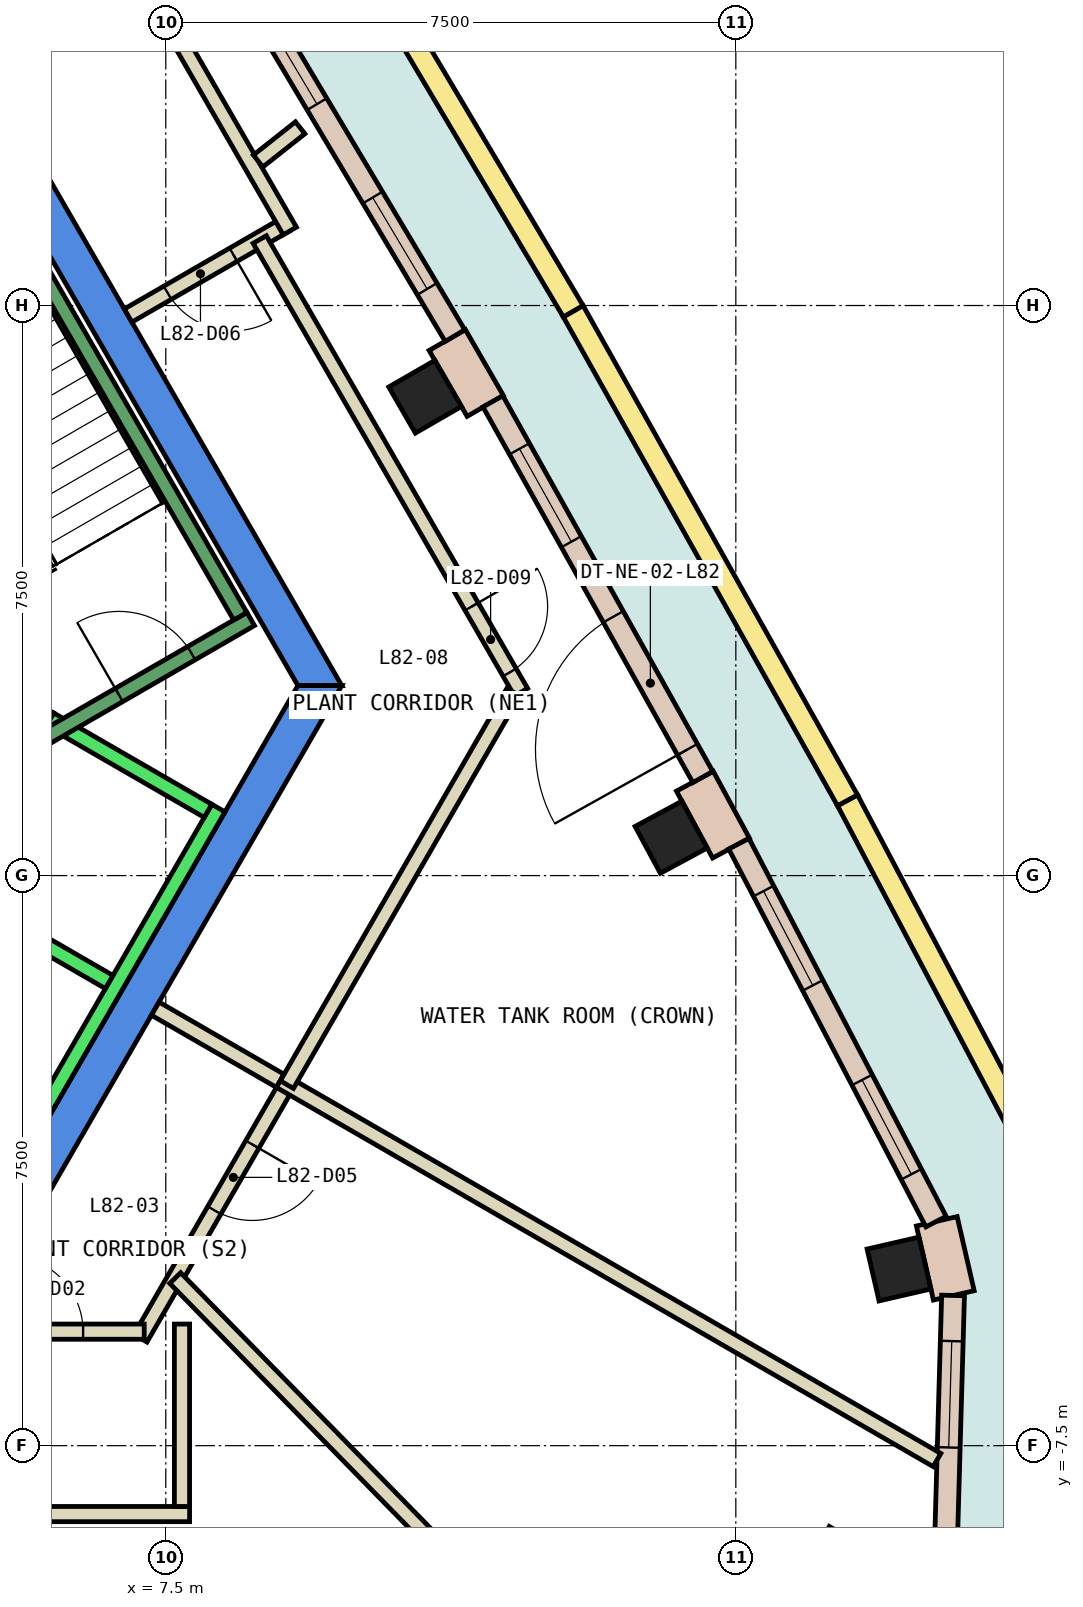
"""IFC4 building model, lengths in metres.
Left out: names, types, materials, properties, quantities, classifications, styles, units other than length and angle.
Written with IfcOpenShell. Run it as: python <this file> out.ifc"""

import sys

from ifc_helpers import new_model, si_unit, direction, frame, frame_2d, origin, origin_2d, place, context, subcontext, project, spatial, polyline, rectangle, outline, extrude, element, fill, save


model = new_model("IFC4")
c1 = context("Model", 3, precision=1e-05, world=origin(), true_north=direction((0.0, 1.0)))
c2 = subcontext(c1, "Body", "Model", "MODEL_VIEW")
j1 = project(units=[si_unit("LENGTHUNIT", "METRE"), si_unit("PLANEANGLEUNIT", "RADIAN")], contexts=[c1])
p1 = place(None, origin())
s1 = spatial("IfcSite", under=j1, at=p1, CompositionType="ELEMENT")
p2 = place(p1, origin())
s2 = spatial("IfcBuilding", under=s1, at=p2, CompositionType="ELEMENT")
p3 = place(p2, frame((0.0, 0.0, 349.4)))
s3 = spatial("IfcBuildingStorey", under=s2, at=p3, CompositionType="ELEMENT", Elevation=349.4)
p4 = place(p3, frame((16.486, -9.519, 0.0), z_axis=(0.0, 0.0, 1.0), x_axis=(-0.866025403784, 0.5, 0.0)))
e1 = element("IfcColumn", 1, at=p4, inside=s3, PredefinedType="COLUMN", context=c2, shape_type="SweptSolid", body=[
    extrude(rectangle(XDim=1.4, YDim=1.4, at=origin_2d()), origin(), (0.0, 0.0, 1.0), 4.15),
])
for number, where, z_axis, x_axis in (
    (2, (17.147, -5.176, 0.0), (0.0, 0.0, 1.0), (-0.224, 0.974, 0.0)),
    (3, (14.149, 0.505, 0.0), (0.0, 0.0, 1.0), (-0.475, 0.88, 0.0)),
    (4, (10.912, 6.3, 0.0), (0.0, 0.0, 1.0), (-0.5, 0.866, 0.0)),
):
    element("IfcColumn", number, at=place(p3, frame(where, z_axis=z_axis, x_axis=x_axis)), inside=s3, PredefinedType="COLUMN", context=c2, shape_type="SweptSolid", body=[
        extrude(rectangle(XDim=0.7, YDim=0.7, at=origin_2d()), origin(), (0.0, 0.0, 1.0), 4.15),
    ])
p5 = place(p3, frame((0.0, 0.0, -0.45)))
e5 = element("IfcWall", 5, at=p5, inside=s3, PredefinedType="SHEAR", context=c2, shape_type="SweptSolid", body=[
    extrude(outline(polyline([(5.486, 9.998), (5.053, 9.748), (9.238, 2.5), (9.815, 2.5), (5.486, 9.998)])), origin(), (0.0, 0.0, 1.0), 4.6),
])
p6 = place(p3, frame((0.0, 0.0, -0.45)))
e6 = element("IfcWall", 6, at=p6, inside=s3, PredefinedType="SHEAR", context=c2, shape_type="SweptSolid", body=[
    extrude(outline(polyline([(4.907, -6.0), (9.815, 2.5), (9.238, 2.5), (4.619, -5.5), (4.907, -6.0)])), origin(), (0.0, 0.0, 1.0), 4.6),
])
p7 = place(p3, frame((17.868, -5.523, 0.0), z_axis=(0.0, 0.0, 1.0), x_axis=(-0.223825449309, 0.974629246556, 0.0)))
e7 = element("IfcWall", 7, at=p7, inside=s3, PredefinedType="STANDARD", context=c2, shape_type="SweptSolid", body=[
    extrude(rectangle(XDim=1.0, YDim=0.55, at=frame_2d((0.5, 0.0))), origin(), (0.0, 0.0, 1.0), 4.15),
])
p8 = place(p3, frame((14.937, 0.362, 0.0), z_axis=(0.0, 0.0, 1.0), x_axis=(-0.475874292304, 0.879513307417, 0.0)))
e8 = element("IfcWall", 8, at=p8, inside=s3, PredefinedType="STANDARD", context=c2, shape_type="SweptSolid", body=[
    extrude(rectangle(XDim=1.0, YDim=0.55, at=frame_2d((0.5, 0.0))), origin(), (0.0, 0.0, 1.0), 4.15),
])
p9 = place(p3, frame((11.703, 6.179, 0.0), z_axis=(0.0, 0.0, 1.0), x_axis=(-0.49960277677, 0.866254619292, 0.0)))
e9 = element("IfcWall", 9, at=p9, inside=s3, PredefinedType="STANDARD", context=c2, shape_type="SweptSolid", body=[
    extrude(rectangle(XDim=1.001, YDim=0.55, at=frame_2d((0.5, 0.0))), origin(), (0.0, 0.0, 1.0), 4.15),
])
p10 = place(p3, frame((17.753, -9.212, 0.0), z_axis=(0.0, 0.0, 1.0), x_axis=(0.028453984805, 0.999595103404, 0.0)))
e10 = element("IfcWall", 10, at=p10, inside=s3, PredefinedType="STANDARD", context=c2, shape_type="SweptSolid", body=[
    extrude(rectangle(XDim=3.689, YDim=0.3, at=frame_2d((1.845, 0.0))), origin(), (0.0, 0.0, 1.0), 4.15),
])
p11 = place(p10, frame((1.689, 0.0, 0.9)))
e11 = element("IfcOpeningElement", 11, at=p11, cuts=e10, PredefinedType="OPENING", context=c2, shape_type="SweptSolid", body=[
    extrude(rectangle(XDim=1.4, YDim=3.0, at=frame_2d((0.7, 1.5))), frame((0.0, 0.16, 0.0), z_axis=(0.0, -1.0, 0.0), x_axis=(1.0, 0.0, 0.0)), (0.0, 0.0, 1.0), 0.32),
])
p12 = place(p3, frame((17.634, -4.552, 0.0), z_axis=(0.0, 0.0, 1.0), x_axis=(-0.462629991654, 0.886551459771, 0.0)))
e12 = element("IfcWall", 12, at=p12, inside=s3, PredefinedType="STANDARD", context=c2, shape_type="SweptSolid", body=[
    extrude(rectangle(XDim=5.607, YDim=0.3, at=frame_2d((2.804, 0.0))), origin(), (0.0, 0.0, 1.0), 4.15),
])
p13 = place(p12, frame((0.702, 0.0, 0.9)))
e13 = element("IfcOpeningElement", 13, at=p13, cuts=e12, PredefinedType="OPENING", context=c2, shape_type="SweptSolid", body=[
    extrude(rectangle(XDim=1.4, YDim=3.0, at=frame_2d((0.7, 1.5))), frame((0.0, 0.16, 0.0), z_axis=(0.0, -1.0, 0.0), x_axis=(1.0, 0.0, 0.0)), (0.0, 0.0, 1.0), 0.32),
])
p14 = place(p12, frame((3.505, 0.0, 0.9)))
e14 = element("IfcOpeningElement", 14, at=p14, cuts=e12, PredefinedType="OPENING", context=c2, shape_type="SweptSolid", body=[
    extrude(rectangle(XDim=1.4, YDim=3.0, at=frame_2d((0.7, 1.5))), frame((0.0, 0.16, 0.0), z_axis=(0.0, -1.0, 0.0), x_axis=(1.0, 0.0, 0.0)), (0.0, 0.0, 1.0), 0.32),
])
p15 = place(p3, frame((14.566, 1.297, 0.0), z_axis=(0.0, 0.0, 1.0), x_axis=(-0.487863884296, 0.872919715896, 0.0)))
e15 = element("IfcWall", 15, at=p15, inside=s3, PredefinedType="STANDARD", context=c2, shape_type="SweptSolid", body=[
    extrude(rectangle(XDim=5.661, YDim=0.3, at=frame_2d((2.831, 0.0))), origin(), (0.0, 0.0, 1.0), 4.15),
])
p16 = place(p15, frame((0.415, 0.0, 0.0)))
e16 = element("IfcOpeningElement", 16, at=p16, cuts=e15, PredefinedType="OPENING", context=c2, shape_type="SweptSolid", body=[
    extrude(rectangle(XDim=2.0, YDim=2.4, at=frame_2d((1.0, 1.2))), frame((0.0, 0.16, 0.0), z_axis=(0.0, -1.0, 0.0), x_axis=(1.0, 0.0, 0.0)), (0.0, 0.0, 1.0), 0.32),
])
p17 = place(p15, frame((3.546, 0.0, 0.9)))
e17 = element("IfcOpeningElement", 17, at=p17, cuts=e15, PredefinedType="OPENING", context=c2, shape_type="SweptSolid", body=[
    extrude(rectangle(XDim=1.4, YDim=3.0, at=frame_2d((0.7, 1.5))), frame((0.0, 0.16, 0.0), z_axis=(0.0, -1.0, 0.0), x_axis=(1.0, 0.0, 0.0)), (0.0, 0.0, 1.0), 0.32),
])
p18 = place(p3, frame((11.305, 7.104, 0.0), z_axis=(0.0, 0.0, 1.0), x_axis=(-0.512115331419, 0.858916694055, 0.0)))
e18 = element("IfcWall", 18, at=p18, inside=s3, PredefinedType="STANDARD", context=c2, shape_type="SweptSolid", body=[
    extrude(rectangle(XDim=5.661, YDim=0.3, at=frame_2d((2.83, 0.0))), origin(), (0.0, 0.0, 1.0), 4.15),
])
p19 = place(p18, frame((0.715, 0.0, 0.9)))
e19 = element("IfcOpeningElement", 19, at=p19, cuts=e18, PredefinedType="OPENING", context=c2, shape_type="SweptSolid", body=[
    extrude(rectangle(XDim=1.4, YDim=3.0, at=frame_2d((0.7, 1.5))), frame((0.0, 0.16, 0.0), z_axis=(0.0, -1.0, 0.0), x_axis=(1.0, 0.0, 0.0)), (0.0, 0.0, 1.0), 0.32),
])
p20 = place(p18, frame((3.546, 0.0, 0.9)))
e20 = element("IfcOpeningElement", 20, at=p20, cuts=e18, PredefinedType="OPENING", context=c2, shape_type="SweptSolid", body=[
    extrude(rectangle(XDim=1.4, YDim=3.0, at=frame_2d((0.7, 1.5))), frame((0.0, 0.16, 0.0), z_axis=(0.0, -1.0, 0.0), x_axis=(1.0, 0.0, 0.0)), (0.0, 0.0, 1.0), 0.32),
])
p21 = place(p3, origin())
e21 = element("IfcWall", 21, at=p21, inside=s3, PredefinedType="PARAPET", context=c2, shape_type="SweptSolid", body=[
    extrude(outline(polyline([(20.049, -5.465), (16.601, 1.062), (16.338, 0.919), (19.747, -5.536), (20.049, -5.465)])), origin(), (0.0, 0.0, 1.0), 1.1),
])
p22 = place(p3, origin())
e22 = element("IfcWall", 22, at=p22, inside=s3, PredefinedType="PARAPET", context=c2, shape_type="SweptSolid", body=[
    extrude(outline(polyline([(16.601, 1.062), (12.99, 7.5), (12.73, 7.35), (16.338, 0.919), (16.601, 1.062)])), origin(), (0.0, 0.0, 1.0), 1.1),
])
p23 = place(p3, origin())
e23 = element("IfcWall", 23, at=p23, inside=s3, PredefinedType="PARAPET", context=c2, shape_type="SweptSolid", body=[
    extrude(outline(polyline([(12.99, 7.5), (9.22, 13.846), (8.964, 13.69), (12.73, 7.35), (12.99, 7.5)])), origin(), (0.0, 0.0, 1.0), 1.1),
])
p24 = place(p3, frame((7.813, -8.4, 0.0), z_axis=(0.0, 0.0, 1.0), x_axis=(-1.0, 0.0, 0.0)))
e24 = element("IfcWall", 24, at=p24, inside=s3, PredefinedType="PARTITIONING", context=c2, shape_type="SweptSolid", body=[
    extrude(rectangle(XDim=6.066, YDim=0.2, at=frame_2d((3.033, 0.0))), origin(), (0.0, 0.0, 1.0), 4.15),
])
p25 = place(p24, frame((2.436, 0.0, 0.0)))
e25 = element("IfcOpeningElement", 25, at=p25, cuts=e24, PredefinedType="OPENING", context=c2, shape_type="SweptSolid", body=[
    extrude(rectangle(XDim=1.0, YDim=2.1, at=frame_2d((0.5, 1.05))), frame((0.0, 0.11, 0.0), z_axis=(0.0, -1.0, 0.0), x_axis=(1.0, 0.0, 0.0)), (0.0, 0.0, 1.0), 0.22),
])
p26 = place(p3, frame((7.713, -5.9, 0.0), z_axis=(0.0, 0.0, 1.0), x_axis=(0.0, -1.0, 0.0)))
e26 = element("IfcWall", 26, at=p26, inside=s3, PredefinedType="PARTITIONING", context=c2, shape_type="SweptSolid", body=[
    extrude(rectangle(XDim=2.4, YDim=0.2, at=frame_2d((1.2, 0.0))), origin(), (0.0, 0.0, 1.0), 4.15),
])
p27 = place(p3, frame((9.093, -2.75, 0.0), z_axis=(0.0, 0.0, 1.0), x_axis=(-0.500084415177, -0.865976661173, 0.0)))
e27 = element("IfcWall", 27, at=p27, inside=s3, PredefinedType="PARTITIONING", context=c2, shape_type="SweptSolid", body=[
    extrude(rectangle(XDim=3.853, YDim=0.2, at=frame_2d((1.927, 0.0))), origin(), (0.0, 0.0, 1.0), 4.15),
])
p28 = place(p27, frame((0.909, 0.0, 0.0)))
e28 = element("IfcOpeningElement", 28, at=p28, cuts=e27, PredefinedType="OPENING", context=c2, shape_type="SweptSolid", body=[
    extrude(rectangle(XDim=1.0, YDim=2.1, at=frame_2d((0.5, 1.05))), frame((0.0, 0.11, 0.0), z_axis=(0.0, -1.0, 0.0), x_axis=(1.0, 0.0, 0.0)), (0.0, 0.0, 1.0), 0.22),
])
p29 = place(p3, frame((7.361, -1.75, 0.0), z_axis=(0.0, 0.0, 1.0), x_axis=(0.865980106173, -0.500078449558, 0.0)))
e29 = element("IfcWall", 29, at=p29, inside=s3, PredefinedType="PARTITIONING", context=c2, shape_type="SweptSolid", body=[
    extrude(rectangle(XDim=1.9, YDim=0.2, at=frame_2d((0.95, 0.0))), origin(), (0.0, 0.0, 1.0), 4.15),
])
p30 = place(p3, frame((7.624, -5.295, 0.0), z_axis=(0.0, 0.0, 1.0), x_axis=(0.699233052575, -0.71489379504, 0.0)))
e30 = element("IfcWall", 30, at=p30, inside=s3, PredefinedType="PARTITIONING", context=c2, shape_type="SweptSolid", body=[
    extrude(rectangle(XDim=9.587, YDim=0.2, at=frame_2d((4.794, 0.0))), origin(), (0.0, 0.0, 1.0), 4.15),
])
p31 = place(p3, frame((9.006, -2.7, 0.0), z_axis=(0.0, 0.0, 1.0), x_axis=(0.866016483303, -0.500015450408, 0.0)))
e31 = element("IfcWall", 31, at=p31, inside=s3, PredefinedType="PARTITIONING", context=c2, shape_type="SweptSolid", body=[
    extrude(rectangle(XDim=9.978, YDim=0.2, at=frame_2d((4.989, 0.0))), origin(), (0.0, 0.0, 1.0), 4.15),
])
p32 = place(p3, frame((9.082, 8.568, 0.0), z_axis=(0.0, 0.0, 1.0), x_axis=(-0.865955154139, -0.50012165622, 0.0)))
e32 = element("IfcWall", 32, at=p32, inside=s3, PredefinedType="PARTITIONING", context=c2, shape_type="SweptSolid", body=[
    extrude(rectangle(XDim=2.4, YDim=0.2, at=frame_2d((1.2, 0.0))), origin(), (0.0, 0.0, 1.0), 4.15),
])
p33 = place(p32, frame((0.8, 0.0, 0.0)))
e33 = element("IfcOpeningElement", 33, at=p33, cuts=e32, PredefinedType="OPENING", context=c2, shape_type="SweptSolid", body=[
    extrude(rectangle(XDim=1.0, YDim=2.1, at=frame_2d((0.5, 1.05))), frame((0.0, 0.11, 0.0), z_axis=(0.0, -1.0, 0.0), x_axis=(1.0, 0.0, 0.0)), (0.0, 0.0, 1.0), 0.22),
])
p34 = place(p3, frame((7.388, 11.502, 0.0), z_axis=(0.0, 0.0, 1.0), x_axis=(0.499993059066, -0.866029411098, 0.0)))
e34 = element("IfcWall", 34, at=p34, inside=s3, PredefinedType="PARTITIONING", context=c2, shape_type="SweptSolid", body=[
    extrude(rectangle(XDim=3.488, YDim=0.2, at=frame_2d((1.744, 0.0))), origin(), (0.0, 0.0, 1.0), 4.15),
])
p35 = place(p3, frame((8.736, 8.368, 0.0), z_axis=(0.0, 0.0, 1.0), x_axis=(0.499995994493, -0.866027716353, 0.0)))
e35 = element("IfcWall", 35, at=p35, inside=s3, PredefinedType="PARTITIONING", context=c2, shape_type="SweptSolid", body=[
    extrude(rectangle(XDim=6.876, YDim=0.2, at=frame_2d((3.438, 0.0))), origin(), (0.0, 0.0, 1.0), 4.15),
])
p36 = place(p35, frame((5.576, 0.0, 0.0)))
e36 = element("IfcOpeningElement", 36, at=p36, cuts=e35, PredefinedType="OPENING", context=c2, shape_type="SweptSolid", body=[
    extrude(rectangle(XDim=1.0, YDim=2.1, at=frame_2d((0.5, 1.05))), frame((0.0, 0.11, 0.0), z_axis=(0.0, -1.0, 0.0), x_axis=(1.0, 0.0, 0.0)), (0.0, 0.0, 1.0), 0.22),
])
p37 = place(p3, frame((12.074, 2.413, 0.0), z_axis=(0.0, 0.0, 1.0), x_axis=(-0.500006035293, -0.866021919278, 0.0)))
e37 = element("IfcWall", 37, at=p37, inside=s3, PredefinedType="PARTITIONING", context=c2, shape_type="SweptSolid", body=[
    extrude(rectangle(XDim=5.962, YDim=0.2, at=frame_2d((2.981, 0.0))), origin(), (0.0, 0.0, 1.0), 4.15),
])
p38 = place(p3, frame((9.268, 9.838, 0.0), z_axis=(0.0, 0.0, 1.0), x_axis=(-0.784572335163, -0.620037297988, 0.0)))
e38 = element("IfcWall", 38, at=p38, inside=s3, PredefinedType="PARTITIONING", context=c2, shape_type="SweptSolid", body=[
    extrude(rectangle(XDim=0.705, YDim=0.2, at=frame_2d((0.353, 0.0))), origin(), (0.0, 0.0, 1.0), 4.15),
])
p39 = place(p3, frame((5.076, -6.0, 0.0), z_axis=(0.0, 0.0, 1.0), x_axis=(1.0, 0.0, 0.0)))
e39 = element("IfcWall", 39, at=p39, inside=s3, PredefinedType="PARTITIONING", context=c2, shape_type="SweptSolid", body=[
    extrude(rectangle(XDim=2.14, YDim=0.2, at=frame_2d((1.07, 0.0))), origin(), (0.0, 0.0, 1.0), 4.15),
])
p40 = place(p39, frame((0.336, 0.0, 0.0)))
e40 = element("IfcOpeningElement", 40, at=p40, cuts=e39, PredefinedType="OPENING", context=c2, shape_type="SweptSolid", body=[
    extrude(rectangle(XDim=1.0, YDim=2.1, at=frame_2d((0.5, 1.05))), frame((0.0, 0.11, 0.0), z_axis=(0.0, -1.0, 0.0), x_axis=(1.0, 0.0, 0.0)), (0.0, 0.0, 1.0), 0.22),
])
p41 = place(p3, frame((3.24, -2.488, 0.0), z_axis=(0.0, 0.0, 1.0), x_axis=(0.500034260056, 0.866005622828, 0.0)))
e41 = element("IfcWall", 41, at=p41, inside=s3, PredefinedType="STANDARD", context=c2, shape_type="SweptSolid", body=[
    extrude(rectangle(XDim=5.399, YDim=0.2, at=frame_2d((2.7, 0.0))), origin(), (0.0, 0.0, 1.0), 4.15),
])
p42 = place(p41, frame((1.225, 0.0, 0.0)))
e42 = element("IfcOpeningElement", 42, at=p42, cuts=e41, PredefinedType="OPENING", context=c2, shape_type="SweptSolid", body=[
    extrude(rectangle(XDim=1.1, YDim=2.1, at=frame_2d((0.55, 1.05))), frame((0.0, 0.11, 0.0), z_axis=(0.0, -1.0, 0.0), x_axis=(1.0, 0.0, 0.0)), (0.0, 0.0, 1.0), 0.22),
])
p43 = place(p3, frame((5.492, -3.788, 0.0), z_axis=(0.0, 0.0, 1.0), x_axis=(0.500034260056, 0.866005622828, 0.0)))
e43 = element("IfcWall", 43, at=p43, inside=s3, PredefinedType="STANDARD", context=c2, shape_type="SweptSolid", body=[
    extrude(rectangle(XDim=5.399, YDim=0.2, at=frame_2d((2.7, 0.0))), origin(), (0.0, 0.0, 1.0), 4.15),
])
for number, where, z_axis, x_axis in (
    (44, (4.677, -0.2, 0.0), (0.0, 0.0, 1.0), (0.866, -0.5, 0.0)),
    (45, (5.977, 2.052, 0.0), (0.0, 0.0, 1.0), (0.866, -0.5, 0.0)),
):
    element("IfcWall", number, at=place(p3, frame(where, z_axis=z_axis, x_axis=x_axis)), inside=s3, PredefinedType="STANDARD", context=c2, shape_type="SweptSolid", body=[
        extrude(rectangle(XDim=2.399, YDim=0.2, at=frame_2d((1.2, 0.0))), origin(), (0.0, 0.0, 1.0), 4.15),
    ])
p44 = place(p3, frame((4.806, 1.176, 0.0), z_axis=(0.0, 0.0, 1.0), x_axis=(0.866059941101, 0.499940174841, 0.0)))
e46 = element("IfcWall", 46, at=p44, inside=s3, PredefinedType="STANDARD", context=c2, shape_type="SweptSolid", body=[
    extrude(rectangle(XDim=4.4, YDim=0.2, at=frame_2d((2.2, 0.0))), origin(), (0.0, 0.0, 1.0), 4.15),
])
p45 = place(p44, frame((2.4, 0.0, 0.0)))
e47 = element("IfcOpeningElement", 47, at=p45, cuts=e46, PredefinedType="OPENING", context=c2, shape_type="SweptSolid", body=[
    extrude(rectangle(XDim=1.1, YDim=2.2, at=frame_2d((0.55, 1.1))), frame((0.0, 0.11, 0.0), z_axis=(0.0, -1.0, 0.0), x_axis=(1.0, 0.0, 0.0)), (0.0, 0.0, 1.0), 0.22),
])
p46 = place(p3, frame((8.48, 3.412, 0.0), z_axis=(0.0, 0.0, 1.0), x_axis=(-0.499978703459, 0.866037698999, 0.0)))
e48 = element("IfcWall", 48, at=p46, inside=s3, PredefinedType="STANDARD", context=c2, shape_type="SweptSolid", body=[
    extrude(rectangle(XDim=6.9, YDim=0.2, at=frame_2d((3.45, 0.0))), origin(), (0.0, 0.0, 1.0), 4.15),
])
p47 = place(p11, origin())
e49 = element("IfcWindow", 49, at=p47, inside=s3, PartitioningType="SINGLE_PANEL", PredefinedType="WINDOW", context=c2, shape_type="SweptSolid", body=[
    extrude(rectangle(XDim=1.4, YDim=3.0, at=frame_2d((0.7, 1.5))), frame((0.0, 0.03, 0.0), z_axis=(0.0, -1.0, 0.0), x_axis=(1.0, 0.0, 0.0)), (0.0, 0.0, 1.0), 0.06),
])
fill(e11, e49)
p48 = place(p13, origin())
e50 = element("IfcWindow", 50, at=p48, inside=s3, PartitioningType="SINGLE_PANEL", PredefinedType="WINDOW", context=c2, shape_type="SweptSolid", body=[
    extrude(rectangle(XDim=1.4, YDim=3.0, at=frame_2d((0.7, 1.5))), frame((0.0, 0.03, 0.0), z_axis=(0.0, -1.0, 0.0), x_axis=(1.0, 0.0, 0.0)), (0.0, 0.0, 1.0), 0.06),
])
fill(e13, e50)
p49 = place(p14, origin())
e51 = element("IfcWindow", 51, at=p49, inside=s3, PartitioningType="SINGLE_PANEL", PredefinedType="WINDOW", context=c2, shape_type="SweptSolid", body=[
    extrude(rectangle(XDim=1.4, YDim=3.0, at=frame_2d((0.7, 1.5))), frame((0.0, 0.03, 0.0), z_axis=(0.0, -1.0, 0.0), x_axis=(1.0, 0.0, 0.0)), (0.0, 0.0, 1.0), 0.06),
])
fill(e14, e51)
p50 = place(p16, origin())
e52 = element("IfcDoor", 52, at=p50, inside=s3, OperationType="SLIDING_TO_LEFT", PredefinedType="DOOR", context=c2, shape_type="SweptSolid", body=[
    extrude(rectangle(XDim=2.0, YDim=2.4, at=frame_2d((1.0, 1.2))), frame((0.0, 0.025, 0.0), z_axis=(0.0, -1.0, 0.0), x_axis=(1.0, 0.0, 0.0)), (0.0, 0.0, 1.0), 0.05),
])
fill(e16, e52)
p51 = place(p17, origin())
e53 = element("IfcWindow", 53, at=p51, inside=s3, PartitioningType="SINGLE_PANEL", PredefinedType="WINDOW", context=c2, shape_type="SweptSolid", body=[
    extrude(rectangle(XDim=1.4, YDim=3.0, at=frame_2d((0.7, 1.5))), frame((0.0, 0.03, 0.0), z_axis=(0.0, -1.0, 0.0), x_axis=(1.0, 0.0, 0.0)), (0.0, 0.0, 1.0), 0.06),
])
fill(e17, e53)
p52 = place(p19, origin())
e54 = element("IfcWindow", 54, at=p52, inside=s3, PartitioningType="SINGLE_PANEL", PredefinedType="WINDOW", context=c2, shape_type="SweptSolid", body=[
    extrude(rectangle(XDim=1.4, YDim=3.0, at=frame_2d((0.7, 1.5))), frame((0.0, 0.03, 0.0), z_axis=(0.0, -1.0, 0.0), x_axis=(1.0, 0.0, 0.0)), (0.0, 0.0, 1.0), 0.06),
])
fill(e19, e54)
p53 = place(p20, origin())
e55 = element("IfcWindow", 55, at=p53, inside=s3, PartitioningType="SINGLE_PANEL", PredefinedType="WINDOW", context=c2, shape_type="SweptSolid", body=[
    extrude(rectangle(XDim=1.4, YDim=3.0, at=frame_2d((0.7, 1.5))), frame((0.0, 0.03, 0.0), z_axis=(0.0, -1.0, 0.0), x_axis=(1.0, 0.0, 0.0)), (0.0, 0.0, 1.0), 0.06),
])
fill(e20, e55)
p54 = place(p40, origin())
e56 = element("IfcDoor", 56, at=p54, inside=s3, OperationType="SINGLE_SWING_RIGHT", PredefinedType="DOOR", context=c2, shape_type="SweptSolid", body=[
    extrude(rectangle(XDim=1.0, YDim=2.1, at=frame_2d((0.5, 1.05))), frame((0.0, 0.025, 0.0), z_axis=(0.0, -1.0, 0.0), x_axis=(1.0, 0.0, 0.0)), (0.0, 0.0, 1.0), 0.05),
])
fill(e40, e56)
p55 = place(p28, origin())
e57 = element("IfcDoor", 57, at=p55, inside=s3, OperationType="SINGLE_SWING_LEFT", PredefinedType="DOOR", context=c2, shape_type="SweptSolid", body=[
    extrude(rectangle(XDim=1.0, YDim=2.1, at=frame_2d((0.5, 1.05))), frame((0.0, 0.025, 0.0), z_axis=(0.0, -1.0, 0.0), x_axis=(1.0, 0.0, 0.0)), (0.0, 0.0, 1.0), 0.05),
])
fill(e28, e57)
p56 = place(p33, origin())
e58 = element("IfcDoor", 58, at=p56, inside=s3, OperationType="SINGLE_SWING_LEFT", PredefinedType="DOOR", context=c2, shape_type="SweptSolid", body=[
    extrude(rectangle(XDim=1.0, YDim=2.1, at=frame_2d((0.5, 1.05))), frame((0.0, 0.025, 0.0), z_axis=(0.0, -1.0, 0.0), x_axis=(1.0, 0.0, 0.0)), (0.0, 0.0, 1.0), 0.05),
])
fill(e33, e58)
p57 = place(p36, origin())
e59 = element("IfcDoor", 59, at=p57, inside=s3, OperationType="SINGLE_SWING_RIGHT", PredefinedType="DOOR", context=c2, shape_type="SweptSolid", body=[
    extrude(rectangle(XDim=1.0, YDim=2.1, at=frame_2d((0.5, 1.05))), frame((0.0, 0.025, 0.0), z_axis=(0.0, -1.0, 0.0), x_axis=(1.0, 0.0, 0.0)), (0.0, 0.0, 1.0), 0.05),
])
fill(e36, e59)
p58 = place(p45, origin())
e60 = element("IfcDoor", 60, at=p58, inside=s3, OperationType="SINGLE_SWING_LEFT", PredefinedType="DOOR", context=c2, shape_type="SweptSolid", body=[
    extrude(rectangle(XDim=1.1, YDim=2.2, at=frame_2d((0.55, 1.1))), frame((0.0, 0.025, 0.0), z_axis=(0.0, -1.0, 0.0), x_axis=(1.0, 0.0, 0.0)), (0.0, 0.0, 1.0), 0.05),
])
fill(e47, e60)
save(model, sys.argv[1])
